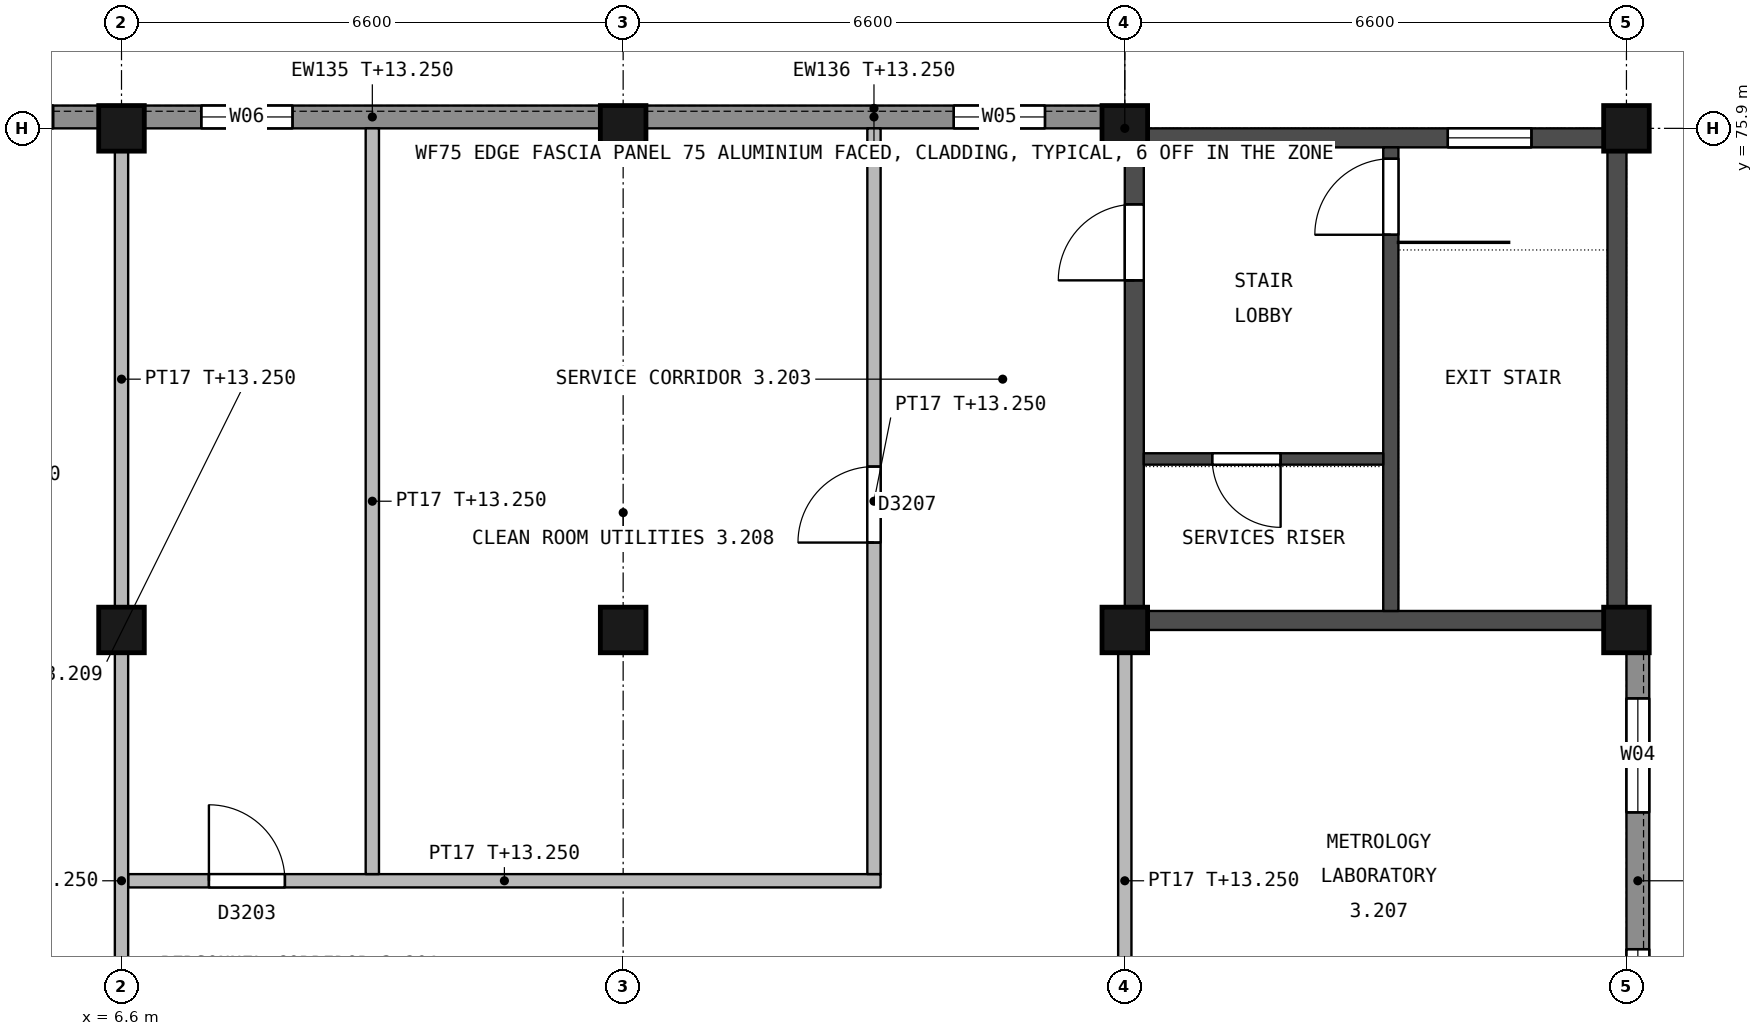
"""IFC4 building model, lengths in metres.
Left out: names, types, materials, properties, quantities, classifications, styles, units other than length and angle.
Written with IfcOpenShell. Run it as: python <this file> out.ifc"""

import sys

from ifc_helpers import new_model, si_unit, direction, frame, frame_2d, origin, origin_2d, place, context, subcontext, project, spatial, rectangle, extrude, element, fill, save


model = new_model("IFC4")
c1 = context("Model", 3, precision=1e-05, world=origin(), true_north=direction((0.0, 1.0)))
c2 = subcontext(c1, "Body", "Model", "MODEL_VIEW")
j1 = project(units=[si_unit("LENGTHUNIT", "METRE"), si_unit("PLANEANGLEUNIT", "RADIAN")], contexts=[c1])
p1 = place(None, origin())
s1 = spatial("IfcSite", under=j1, at=p1, CompositionType="ELEMENT")
p2 = place(p1, origin())
s2 = spatial("IfcBuilding", under=s1, at=p2, CompositionType="ELEMENT")
p3 = place(p2, frame((0.0, 0.0, 9.9)))
s3 = spatial("IfcBuildingStorey", under=s2, at=p3, CompositionType="ELEMENT", Elevation=9.9)
for number, where, z_axis, x_axis in (
    (1, (6.6, 69.3, 0.0), (0.0, 0.0, 1.0), (1.0, 0.0, 0.0)),
    (2, (6.6, 75.9, 0.0), (0.0, 0.0, 1.0), (1.0, 0.0, 0.0)),
    (3, (13.2, 69.3, 0.0), (0.0, 0.0, 1.0), (1.0, 0.0, 0.0)),
    (4, (13.2, 75.9, 0.0), (0.0, 0.0, 1.0), (1.0, 0.0, 0.0)),
    (5, (19.8, 69.3, 0.0), (0.0, 0.0, 1.0), (1.0, 0.0, 0.0)),
    (6, (19.8, 75.9, 0.0), (0.0, 0.0, 1.0), (1.0, 0.0, 0.0)),
    (7, (26.4, 69.3, 0.0), (0.0, 0.0, 1.0), (1.0, 0.0, 0.0)),
    (8, (26.4, 75.9, 0.0), (0.0, 0.0, 1.0), (1.0, 0.0, 0.0)),
):
    element("IfcColumn", number, at=place(p3, frame(where, z_axis=z_axis, x_axis=x_axis)), inside=s3, PredefinedType="COLUMN", context=c2, shape_type="SweptSolid", body=[
        extrude(rectangle(XDim=0.6, YDim=0.6, at=origin_2d()), origin(), (0.0, 0.0, 1.0), 4.5),
    ])
p4 = place(p3, frame((19.925, 75.9, 0.0), z_axis=(0.0, 0.0, 1.0), x_axis=(0.0, -1.0, 0.0)))
e9 = element("IfcWall", 9, at=p4, inside=s3, PredefinedType="SHEAR", context=c2, shape_type="SweptSolid", body=[
    extrude(rectangle(XDim=6.6, YDim=0.25, at=frame_2d((3.3, 0.0))), origin(), (0.0, 0.0, 1.0), 4.25),
])
p5 = place(p4, frame((1.0, 0.0, 0.0)))
e10 = element("IfcOpeningElement", 10, at=p5, cuts=e9, PredefinedType="OPENING", context=c2, shape_type="SweptSolid", body=[
    extrude(rectangle(XDim=1.0, YDim=2.1, at=frame_2d((0.5, 1.05))), frame((0.0, 0.135, 0.0), z_axis=(0.0, -1.0, 0.0), x_axis=(1.0, 0.0, 0.0)), (0.0, 0.0, 1.0), 0.27),
])
p6 = place(p3, frame((26.275, 75.9, 0.0), z_axis=(0.0, 0.0, 1.0), x_axis=(0.0, -1.0, 0.0)))
e11 = element("IfcWall", 11, at=p6, inside=s3, PredefinedType="SHEAR", context=c2, shape_type="SweptSolid", body=[
    extrude(rectangle(XDim=6.6, YDim=0.25, at=frame_2d((3.3, 0.0))), origin(), (0.0, 0.0, 1.0), 4.25),
])
p7 = place(p3, frame((20.05, 75.775, 0.0), z_axis=(0.0, 0.0, 1.0), x_axis=(1.0, 0.0, 0.0)))
e12 = element("IfcWall", 12, at=p7, inside=s3, PredefinedType="SHEAR", context=c2, shape_type="SweptSolid", body=[
    extrude(rectangle(XDim=6.1, YDim=0.25, at=frame_2d((3.05, 0.0))), origin(), (0.0, 0.0, 1.0), 4.25),
])
p8 = place(p7, frame((4.0, 0.0, 0.7)))
e13 = element("IfcOpeningElement", 13, at=p8, cuts=e12, PredefinedType="OPENING", context=c2, shape_type="SweptSolid", body=[
    extrude(rectangle(XDim=1.1, YDim=1.5, at=frame_2d((0.55, 0.75))), frame((0.0, 0.135, 0.0), z_axis=(0.0, -1.0, 0.0), x_axis=(1.0, 0.0, 0.0)), (0.0, 0.0, 1.0), 0.27),
])
p9 = place(p3, frame((20.05, 69.425, 0.0), z_axis=(0.0, 0.0, 1.0), x_axis=(1.0, 0.0, 0.0)))
e14 = element("IfcWall", 14, at=p9, inside=s3, PredefinedType="SHEAR", context=c2, shape_type="SweptSolid", body=[
    extrude(rectangle(XDim=6.1, YDim=0.25, at=frame_2d((3.05, 0.0))), origin(), (0.0, 0.0, 1.0), 4.25),
])
p10 = place(p3, frame((23.3, 75.65, 0.0), z_axis=(0.0, 0.0, 1.0), x_axis=(0.0, -1.0, 0.0)))
e15 = element("IfcWall", 15, at=p10, inside=s3, PredefinedType="SHEAR", context=c2, shape_type="SweptSolid", body=[
    extrude(rectangle(XDim=6.1, YDim=0.2, at=frame_2d((3.05, 0.0))), origin(), (0.0, 0.0, 1.0), 4.25),
])
p11 = place(p10, frame((0.15, 0.0, 0.0)))
e16 = element("IfcOpeningElement", 16, at=p11, cuts=e15, PredefinedType="OPENING", context=c2, shape_type="SweptSolid", body=[
    extrude(rectangle(XDim=1.0, YDim=2.1, at=frame_2d((0.5, 1.05))), frame((0.0, 0.11, 0.0), z_axis=(0.0, -1.0, 0.0), x_axis=(1.0, 0.0, 0.0)), (0.0, 0.0, 1.0), 0.22),
])
p12 = place(p3, frame((20.05, 71.55, 0.0), z_axis=(0.0, 0.0, 1.0), x_axis=(1.0, 0.0, 0.0)))
e17 = element("IfcWall", 17, at=p12, inside=s3, PredefinedType="SHEAR", context=c2, shape_type="SweptSolid", body=[
    extrude(rectangle(XDim=3.15, YDim=0.15, at=frame_2d((1.575, 0.0))), origin(), (0.0, 0.0, 1.0), 4.25),
])
p13 = place(p12, frame((0.9, 0.0, 0.0)))
e18 = element("IfcOpeningElement", 18, at=p13, cuts=e17, PredefinedType="OPENING", context=c2, shape_type="SweptSolid", body=[
    extrude(rectangle(XDim=0.9, YDim=2.1, at=frame_2d((0.45, 1.05))), frame((0.0, 0.085, 0.0), z_axis=(0.0, -1.0, 0.0), x_axis=(1.0, 0.0, 0.0)), (0.0, 0.0, 1.0), 0.17),
])
p14 = place(p3, frame((26.55, 69.0, 0.0), z_axis=(0.0, 0.0, 1.0), x_axis=(0.0, -1.0, 0.0)))
e19 = element("IfcWall", 19, at=p14, inside=s3, PredefinedType="STANDARD", context=c2, shape_type="SweptSolid", body=[
    extrude(rectangle(XDim=6.0, YDim=0.3, at=frame_2d((3.0, 0.0))), origin(), (0.0, 0.0, 1.0), 3.35),
])
p15 = place(p14, frame((3.9, 0.0, 1.2)))
e20 = element("IfcOpeningElement", 20, at=p15, cuts=e19, PredefinedType="OPENING", context=c2, shape_type="SweptSolid", body=[
    extrude(rectangle(XDim=1.5, YDim=1.2, at=frame_2d((0.75, 0.6))), frame((0.0, 0.16, 0.0), z_axis=(0.0, -1.0, 0.0), x_axis=(1.0, 0.0, 0.0)), (0.0, 0.0, 1.0), 0.32),
])
p16 = place(p14, frame((0.6, 0.0, 1.2)))
e21 = element("IfcOpeningElement", 21, at=p16, cuts=e19, PredefinedType="OPENING", context=c2, shape_type="SweptSolid", body=[
    extrude(rectangle(XDim=1.5, YDim=1.2, at=frame_2d((0.75, 0.6))), frame((0.0, 0.16, 0.0), z_axis=(0.0, -1.0, 0.0), x_axis=(1.0, 0.0, 0.0)), (0.0, 0.0, 1.0), 0.32),
])
p17 = place(p3, frame((0.3, 76.05, 0.0), z_axis=(0.0, 0.0, 1.0), x_axis=(1.0, 0.0, 0.0)))
e22 = element("IfcWall", 22, at=p17, inside=s3, PredefinedType="STANDARD", context=c2, shape_type="SweptSolid", body=[
    extrude(rectangle(XDim=6.0, YDim=0.3, at=frame_2d((3.0, 0.0))), origin(), (0.0, 0.0, 1.0), 3.35),
])
p18 = place(p17, frame((0.6, 0.0, 1.2)))
e23 = element("IfcOpeningElement", 23, at=p18, cuts=e22, PredefinedType="OPENING", context=c2, shape_type="SweptSolid", body=[
    extrude(rectangle(XDim=1.5, YDim=1.2, at=frame_2d((0.75, 0.6))), frame((0.0, 0.16, 0.0), z_axis=(0.0, -1.0, 0.0), x_axis=(1.0, 0.0, 0.0)), (0.0, 0.0, 1.0), 0.32),
])
p19 = place(p17, frame((3.9, 0.0, 1.2)))
e24 = element("IfcOpeningElement", 24, at=p19, cuts=e22, PredefinedType="OPENING", context=c2, shape_type="SweptSolid", body=[
    extrude(rectangle(XDim=1.5, YDim=1.2, at=frame_2d((0.75, 0.6))), frame((0.0, 0.16, 0.0), z_axis=(0.0, -1.0, 0.0), x_axis=(1.0, 0.0, 0.0)), (0.0, 0.0, 1.0), 0.32),
])
p20 = place(p3, frame((6.9, 76.05, 0.0), z_axis=(0.0, 0.0, 1.0), x_axis=(1.0, 0.0, 0.0)))
e25 = element("IfcWall", 25, at=p20, inside=s3, PredefinedType="STANDARD", context=c2, shape_type="SweptSolid", body=[
    extrude(rectangle(XDim=6.0, YDim=0.3, at=frame_2d((3.0, 0.0))), origin(), (0.0, 0.0, 1.0), 3.35),
])
p21 = place(p20, frame((0.75, 0.0, 2.4)))
e26 = element("IfcOpeningElement", 26, at=p21, cuts=e25, PredefinedType="OPENING", context=c2, shape_type="SweptSolid", body=[
    extrude(rectangle(XDim=1.2, YDim=0.6, at=frame_2d((0.6, 0.3))), frame((0.0, 0.16, 0.0), z_axis=(0.0, -1.0, 0.0), x_axis=(1.0, 0.0, 0.0)), (0.0, 0.0, 1.0), 0.32),
])
p22 = place(p3, frame((13.5, 76.05, 0.0), z_axis=(0.0, 0.0, 1.0), x_axis=(1.0, 0.0, 0.0)))
e27 = element("IfcWall", 27, at=p22, inside=s3, PredefinedType="STANDARD", context=c2, shape_type="SweptSolid", body=[
    extrude(rectangle(XDim=6.0, YDim=0.3, at=frame_2d((3.0, 0.0))), origin(), (0.0, 0.0, 1.0), 3.35),
])
p23 = place(p22, frame((4.05, 0.0, 1.1)))
e28 = element("IfcOpeningElement", 28, at=p23, cuts=e27, PredefinedType="OPENING", context=c2, shape_type="SweptSolid", body=[
    extrude(rectangle(XDim=1.2, YDim=1.2, at=frame_2d((0.6, 0.6))), frame((0.0, 0.16, 0.0), z_axis=(0.0, -1.0, 0.0), x_axis=(1.0, 0.0, 0.0)), (0.0, 0.0, 1.0), 0.32),
])
p24 = place(p3, frame((6.688, 66.0, 0.0), z_axis=(0.0, 0.0, 1.0), x_axis=(1.0, 0.0, 0.0)))
e29 = element("IfcWall", 29, at=p24, inside=s3, PredefinedType="PARTITIONING", context=c2, shape_type="SweptSolid", body=[
    extrude(rectangle(XDim=9.899, YDim=0.175, at=frame_2d((4.949, 0.0))), origin(), (0.0, 0.0, 1.0), 3.35),
])
p25 = place(p24, frame((1.062, 0.0, 0.0)))
e30 = element("IfcOpeningElement", 30, at=p25, cuts=e29, PredefinedType="OPENING", context=c2, shape_type="SweptSolid", body=[
    extrude(rectangle(XDim=1.0, YDim=2.1, at=frame_2d((0.5, 1.05))), frame((0.0, 0.097, 0.0), z_axis=(0.0, -1.0, 0.0), x_axis=(1.0, 0.0, 0.0)), (0.0, 0.0, 1.0), 0.195),
])
p26 = place(p3, frame((6.6, 63.0, 0.0), z_axis=(0.0, 0.0, 1.0), x_axis=(0.0, 1.0, 0.0)))
e31 = element("IfcWall", 31, at=p26, inside=s3, PredefinedType="PARTITIONING", context=c2, shape_type="SweptSolid", body=[
    extrude(rectangle(XDim=6.0, YDim=0.175, at=frame_2d((3.0, 0.0))), origin(), (0.0, 0.0, 1.0), 3.35),
])
p27 = place(p26, frame((0.85, 0.0, 0.0)))
e32 = element("IfcOpeningElement", 32, at=p27, cuts=e31, PredefinedType="OPENING", context=c2, shape_type="SweptSolid", body=[
    extrude(rectangle(XDim=1.0, YDim=2.1, at=frame_2d((0.5, 1.05))), frame((0.0, 0.097, 0.0), z_axis=(0.0, -1.0, 0.0), x_axis=(1.0, 0.0, 0.0)), (0.0, 0.0, 1.0), 0.195),
])
p28 = place(p3, frame((6.6, 69.6, 0.0), z_axis=(0.0, 0.0, 1.0), x_axis=(0.0, 1.0, 0.0)))
e33 = element("IfcWall", 33, at=p28, inside=s3, PredefinedType="PARTITIONING", context=c2, shape_type="SweptSolid", body=[
    extrude(rectangle(XDim=6.0, YDim=0.175, at=frame_2d((3.0, 0.0))), origin(), (0.0, 0.0, 1.0), 3.35),
])
p29 = place(p3, frame((9.9, 66.088, 0.0), z_axis=(0.0, 0.0, 1.0), x_axis=(0.0, 1.0, 0.0)))
e34 = element("IfcWall", 34, at=p29, inside=s3, PredefinedType="PARTITIONING", context=c2, shape_type="SweptSolid", body=[
    extrude(rectangle(XDim=9.812, YDim=0.175, at=frame_2d((4.906, 0.0))), origin(), (0.0, 0.0, 1.0), 3.35),
])
p30 = place(p3, frame((16.5, 66.088, 0.0), z_axis=(0.0, 0.0, 1.0), x_axis=(0.0, 1.0, 0.0)))
e35 = element("IfcWall", 35, at=p30, inside=s3, PredefinedType="PARTITIONING", context=c2, shape_type="SweptSolid", body=[
    extrude(rectangle(XDim=9.812, YDim=0.175, at=frame_2d((4.906, 0.0))), origin(), (0.0, 0.0, 1.0), 3.35),
])
p31 = place(p30, frame((4.362, 0.0, 0.0)))
e36 = element("IfcOpeningElement", 36, at=p31, cuts=e35, PredefinedType="OPENING", context=c2, shape_type="SweptSolid", body=[
    extrude(rectangle(XDim=1.0, YDim=2.1, at=frame_2d((0.5, 1.05))), frame((0.0, 0.097, 0.0), z_axis=(0.0, -1.0, 0.0), x_axis=(1.0, 0.0, 0.0)), (0.0, 0.0, 1.0), 0.195),
])
p32 = place(p3, frame((19.8, 69.0, 0.0), z_axis=(0.0, 0.0, 1.0), x_axis=(0.0, -1.0, 0.0)))
e37 = element("IfcWall", 37, at=p32, inside=s3, PredefinedType="PARTITIONING", context=c2, shape_type="SweptSolid", body=[
    extrude(rectangle(XDim=6.0, YDim=0.175, at=frame_2d((3.0, 0.0))), origin(), (0.0, 0.0, 1.0), 3.35),
])
p33 = place(p32, frame((4.15, 0.0, 0.0)))
e38 = element("IfcOpeningElement", 38, at=p33, cuts=e37, PredefinedType="OPENING", context=c2, shape_type="SweptSolid", body=[
    extrude(rectangle(XDim=1.0, YDim=2.1, at=frame_2d((0.5, 1.05))), frame((0.0, 0.097, 0.0), z_axis=(0.0, -1.0, 0.0), x_axis=(1.0, 0.0, 0.0)), (0.0, 0.0, 1.0), 0.195),
])
p34 = place(p13, origin())
e39 = element("IfcDoor", 39, at=p34, inside=s3, OperationType="SINGLE_SWING_RIGHT", PredefinedType="DOOR", context=c2, shape_type="SweptSolid", body=[
    extrude(rectangle(XDim=0.9, YDim=2.1, at=frame_2d((0.45, 1.05))), frame((0.0, 0.025, 0.0), z_axis=(0.0, -1.0, 0.0), x_axis=(1.0, 0.0, 0.0)), (0.0, 0.0, 1.0), 0.05),
])
fill(e18, e39)
p35 = place(p5, origin())
e40 = element("IfcDoor", 40, at=p35, inside=s3, OperationType="SINGLE_SWING_RIGHT", PredefinedType="DOOR", context=c2, shape_type="SweptSolid", body=[
    extrude(rectangle(XDim=1.0, YDim=2.1, at=frame_2d((0.5, 1.05))), frame((0.0, 0.025, 0.0), z_axis=(0.0, -1.0, 0.0), x_axis=(1.0, 0.0, 0.0)), (0.0, 0.0, 1.0), 0.05),
])
fill(e10, e40)
p36 = place(p11, origin())
e41 = element("IfcDoor", 41, at=p36, inside=s3, OperationType="SINGLE_SWING_RIGHT", PredefinedType="DOOR", context=c2, shape_type="SweptSolid", body=[
    extrude(rectangle(XDim=1.0, YDim=2.1, at=frame_2d((0.5, 1.05))), frame((0.0, 0.025, 0.0), z_axis=(0.0, -1.0, 0.0), x_axis=(1.0, 0.0, 0.0)), (0.0, 0.0, 1.0), 0.05),
])
fill(e16, e41)
p37 = place(p8, origin())
e42 = element("IfcWindow", 42, at=p37, inside=s3, PartitioningType="SINGLE_PANEL", PredefinedType="WINDOW", context=c2, shape_type="SweptSolid", body=[
    extrude(rectangle(XDim=1.1, YDim=1.5, at=frame_2d((0.55, 0.75))), frame((0.0, 0.03, 0.0), z_axis=(0.0, -1.0, 0.0), x_axis=(1.0, 0.0, 0.0)), (0.0, 0.0, 1.0), 0.06),
])
fill(e13, e42)
p38 = place(p15, origin())
e43 = element("IfcWindow", 43, at=p38, inside=s3, PartitioningType="SINGLE_PANEL", PredefinedType="WINDOW", context=c2, shape_type="SweptSolid", body=[
    extrude(rectangle(XDim=1.5, YDim=1.2, at=frame_2d((0.75, 0.6))), frame((0.0, 0.03, 0.0), z_axis=(0.0, -1.0, 0.0), x_axis=(1.0, 0.0, 0.0)), (0.0, 0.0, 1.0), 0.06),
])
fill(e20, e43)
p39 = place(p16, origin())
e44 = element("IfcWindow", 44, at=p39, inside=s3, PartitioningType="SINGLE_PANEL", PredefinedType="WINDOW", context=c2, shape_type="SweptSolid", body=[
    extrude(rectangle(XDim=1.5, YDim=1.2, at=frame_2d((0.75, 0.6))), frame((0.0, 0.03, 0.0), z_axis=(0.0, -1.0, 0.0), x_axis=(1.0, 0.0, 0.0)), (0.0, 0.0, 1.0), 0.06),
])
fill(e21, e44)
p40 = place(p19, origin())
e45 = element("IfcWindow", 45, at=p40, inside=s3, PartitioningType="SINGLE_PANEL", PredefinedType="WINDOW", context=c2, shape_type="SweptSolid", body=[
    extrude(rectangle(XDim=1.5, YDim=1.2, at=frame_2d((0.75, 0.6))), frame((0.0, 0.03, 0.0), z_axis=(0.0, -1.0, 0.0), x_axis=(1.0, 0.0, 0.0)), (0.0, 0.0, 1.0), 0.06),
])
fill(e24, e45)
p41 = place(p21, origin())
e46 = element("IfcWindow", 46, at=p41, inside=s3, PartitioningType="SINGLE_PANEL", PredefinedType="WINDOW", context=c2, shape_type="SweptSolid", body=[
    extrude(rectangle(XDim=1.2, YDim=0.6, at=frame_2d((0.6, 0.3))), frame((0.0, 0.03, 0.0), z_axis=(0.0, -1.0, 0.0), x_axis=(1.0, 0.0, 0.0)), (0.0, 0.0, 1.0), 0.06),
])
fill(e26, e46)
p42 = place(p23, origin())
e47 = element("IfcWindow", 47, at=p42, inside=s3, PartitioningType="SINGLE_PANEL", PredefinedType="WINDOW", context=c2, shape_type="SweptSolid", body=[
    extrude(rectangle(XDim=1.2, YDim=1.2, at=frame_2d((0.6, 0.6))), frame((0.0, 0.03, 0.0), z_axis=(0.0, -1.0, 0.0), x_axis=(1.0, 0.0, 0.0)), (0.0, 0.0, 1.0), 0.06),
])
fill(e28, e47)
p43 = place(p25, origin())
e48 = element("IfcDoor", 48, at=p43, inside=s3, OperationType="SINGLE_SWING_LEFT", PredefinedType="DOOR", context=c2, shape_type="SweptSolid", body=[
    extrude(rectangle(XDim=1.0, YDim=2.1, at=frame_2d((0.5, 1.05))), frame((0.0, 0.025, 0.0), z_axis=(0.0, -1.0, 0.0), x_axis=(1.0, 0.0, 0.0)), (0.0, 0.0, 1.0), 0.05),
])
fill(e30, e48)
p44 = place(p31, origin())
e49 = element("IfcDoor", 49, at=p44, inside=s3, OperationType="SINGLE_SWING_LEFT", PredefinedType="DOOR", context=c2, shape_type="SweptSolid", body=[
    extrude(rectangle(XDim=1.0, YDim=2.1, at=frame_2d((0.5, 1.05))), frame((0.0, 0.025, 0.0), z_axis=(0.0, -1.0, 0.0), x_axis=(1.0, 0.0, 0.0)), (0.0, 0.0, 1.0), 0.05),
])
fill(e36, e49)
save(model, sys.argv[1])
